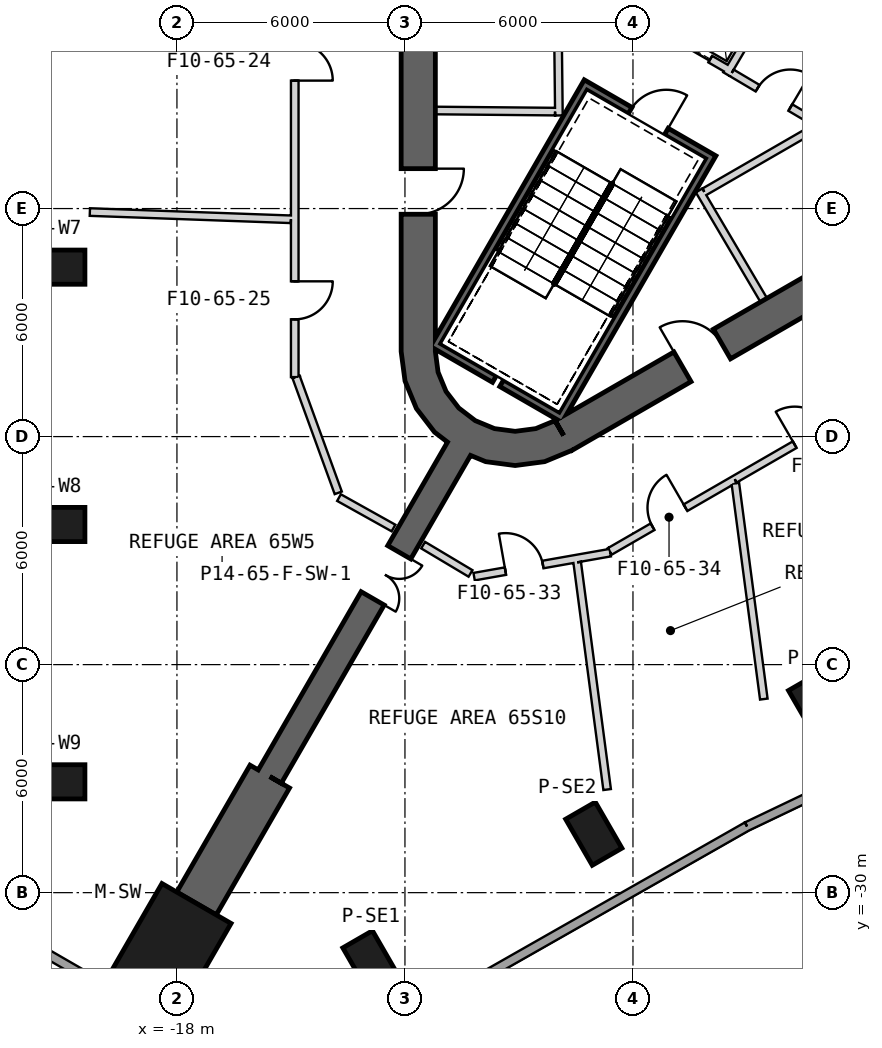
"""IFC4 building model, lengths in metres.
Left out: names, types, materials, properties, quantities, classifications, styles, units other than length and angle.
Written with IfcOpenShell. Run it as: python <this file> out.ifc"""

import sys

from ifc_helpers import new_model, si_unit, direction, frame, frame_2d, origin, origin_2d, place, context, subcontext, project, spatial, polyline, rectangle, outline, extrude, element, fill, save


model = new_model("IFC4")
c1 = context("Model", 3, precision=1e-05, world=origin(), true_north=direction((0.0, 1.0)))
c2 = subcontext(c1, "Body", "Model", "MODEL_VIEW")
j1 = project(units=[si_unit("LENGTHUNIT", "METRE"), si_unit("PLANEANGLEUNIT", "RADIAN")], contexts=[c1])
p1 = place(None, origin())
s1 = spatial("IfcSite", under=j1, at=p1, CompositionType="ELEMENT")
p2 = place(p1, origin())
s2 = spatial("IfcBuilding", under=s1, at=p2, CompositionType="ELEMENT")
p3 = place(p2, frame((0.0, 0.0, 292.7)))
s3 = spatial("IfcBuildingStorey", under=s2, at=p3, CompositionType="ELEMENT", Elevation=292.7)
p4 = place(p3, frame((-18.135, -31.411, 0.0), z_axis=(0.0, 0.0, 1.0), x_axis=(-0.5, -0.866025403784, 0.0)))
e1 = element("IfcColumn", 1, at=p4, inside=s3, PredefinedType="COLUMN", context=c2, shape_type="SweptSolid", body=[
    extrude(rectangle(XDim=2.6, YDim=2.1, at=origin_2d()), origin(), (0.0, 0.0, 1.0), 5.7),
])
for number, where, z_axis, x_axis in (
    (2, (-21.121, -13.542, 0.0), (0.0, 0.0, 1.0), (-1.0, 0.0, 0.0)),
    (3, (-21.121, -20.313, 0.0), (0.0, 0.0, 1.0), (-1.0, 0.0, 0.0)),
    (4, (-21.121, -27.084, 0.0), (0.0, 0.0, 1.0), (-1.0, 0.0, 0.0)),
    (5, (-12.895, -31.833, 0.0), (0.0, 0.0, 1.0), (0.5, -0.866, 0.0)),
    (6, (-7.031, -28.448, 0.0), (0.0, 0.0, 1.0), (0.5, -0.866, 0.0)),
    (7, (-1.167, -25.063, 0.0), (0.0, 0.0, 1.0), (0.5, -0.866, 0.0)),
):
    element("IfcColumn", number, at=place(p3, frame(where, z_axis=z_axis, x_axis=x_axis)), inside=s3, PredefinedType="COLUMN", context=c2, shape_type="SweptSolid", body=[
        extrude(rectangle(XDim=1.4, YDim=0.9, at=origin_2d()), origin(), (0.0, 0.0, 1.0), 5.7),
    ])
p5 = place(p3, frame((-11.65, 15.762, 0.0), z_axis=(0.0, 0.0, 1.0), x_axis=(0.0, -1.0, 0.0)))
e8 = element("IfcWall", 8, at=p5, inside=s3, PredefinedType="SHEAR", context=c2, shape_type="SweptSolid", body=[
    extrude(rectangle(XDim=31.523, YDim=0.9, at=frame_2d((15.762, 0.0))), origin(), (0.0, 0.0, 1.0), 6.0),
])
p6 = place(p5, frame((3.612, 0.0, 0.0)))
e9 = element("IfcOpeningElement", 9, at=p6, cuts=e8, PredefinedType="OPENING", context=c2, shape_type="SweptSolid", body=[
    extrude(rectangle(XDim=1.2, YDim=2.4, at=frame_2d((0.6, 1.2))), frame((0.0, 0.46, 0.0), z_axis=(0.0, -1.0, 0.0), x_axis=(1.0, 0.0, 0.0)), (0.0, 0.0, 1.0), 0.92),
])
p7 = place(p5, frame((26.712, 0.0, 0.0)))
e10 = element("IfcOpeningElement", 10, at=p7, cuts=e8, PredefinedType="OPENING", context=c2, shape_type="SweptSolid", body=[
    extrude(rectangle(XDim=1.2, YDim=2.4, at=frame_2d((0.6, 1.2))), frame((0.0, 0.46, 0.0), z_axis=(0.0, -1.0, 0.0), x_axis=(1.0, 0.0, 0.0)), (0.0, 0.0, 1.0), 0.92),
])
p8 = place(p3, frame((-7.825, -17.97, 0.0), z_axis=(0.0, 0.0, 1.0), x_axis=(0.866028369851, 0.499994862586, 0.0)))
e11 = element("IfcWall", 11, at=p8, inside=s3, PredefinedType="SHEAR", context=c2, shape_type="SweptSolid", body=[
    extrude(rectangle(XDim=31.523, YDim=0.9, at=frame_2d((15.762, 0.0))), origin(), (0.0, 0.0, 1.0), 6.0),
])
p9 = place(p8, frame((26.712, 0.0, 0.0)))
e12 = element("IfcOpeningElement", 12, at=p9, cuts=e11, PredefinedType="OPENING", context=c2, shape_type="SweptSolid", body=[
    extrude(rectangle(XDim=1.2, YDim=2.4, at=frame_2d((0.6, 1.2))), frame((0.0, 0.46, 0.0), z_axis=(0.0, -1.0, 0.0), x_axis=(1.0, 0.0, 0.0)), (0.0, 0.0, 1.0), 0.92),
])
p10 = place(p8, frame((3.612, 0.0, 0.0)))
e13 = element("IfcOpeningElement", 13, at=p10, cuts=e11, PredefinedType="OPENING", context=c2, shape_type="SweptSolid", body=[
    extrude(rectangle(XDim=1.2, YDim=2.4, at=frame_2d((0.6, 1.2))), frame((0.0, 0.46, 0.0), z_axis=(0.0, -1.0, 0.0), x_axis=(1.0, 0.0, 0.0)), (0.0, 0.0, 1.0), 0.92),
])
p11 = place(p3, origin())
e14 = element("IfcWall", 14, at=p11, inside=s3, PredefinedType="SHEAR", context=c2, shape_type="SweptSolid", body=[
    extrude(outline(polyline([(-12.1, -15.762), (-11.998, -16.538), (-11.698, -17.262), (-11.221, -17.883), (-10.6, -18.36), (-9.876, -18.659), (-9.1, -18.762), (-8.323, -18.659), (-7.6, -18.36), (-8.05, -17.58), (-8.556, -17.79), (-9.1, -17.862), (-9.644, -17.79), (-10.15, -17.58), (-10.585, -17.247), (-10.919, -16.812), (-11.128, -16.305), (-11.2, -15.762), (-12.1, -15.762)])), origin(), (0.0, 0.0, 1.0), 6.0),
])
p12 = place(p3, frame((-10.575, -18.316, 0.0), z_axis=(0.0, 0.0, 1.0), x_axis=(-0.500007350791, -0.866021159762, 0.0)))
e15 = element("IfcWall", 15, at=p12, inside=s3, PredefinedType="SHEAR", context=c2, shape_type="SweptSolid", body=[
    extrude(rectangle(XDim=9.965, YDim=0.7, at=frame_2d((4.982, 0.0))), origin(), (0.0, 0.0, 1.0), 6.0),
])
p13 = place(p12, frame((3.15, 0.0, 0.0)))
e16 = element("IfcOpeningElement", 16, at=p13, cuts=e15, PredefinedType="OPENING", context=c2, shape_type="SweptSolid", body=[
    extrude(rectangle(XDim=1.4, YDim=2.4, at=frame_2d((0.7, 1.2))), frame((0.0, 0.36, 0.0), z_axis=(0.0, -1.0, 0.0), x_axis=(1.0, 0.0, 0.0)), (0.0, 0.0, 1.0), 0.72),
])
p14 = place(p3, frame((-15.557, -26.946, -0.35), z_axis=(0.0, 0.0, 1.0), x_axis=(-0.499980071345, -0.866036909293, 0.0)))
e17 = element("IfcWall", 17, at=p14, inside=s3, PredefinedType="SHEAR", context=c2, shape_type="SweptSolid", body=[
    extrude(rectangle(XDim=3.856, YDim=1.2, at=frame_2d((1.928, 0.0))), origin(), (0.0, 0.0, 1.0), 6.35),
])
p15 = place(p3, frame((-21.986, -31.283, 0.0), z_axis=(0.0, 0.0, 1.0), x_axis=(0.866022320763, -0.500005339912, 0.0)))
e18 = element("IfcWall", 18, at=p15, inside=s3, PredefinedType="SOLIDWALL", context=c2, shape_type="SweptSolid", body=[
    extrude(rectangle(XDim=6.798, YDim=0.24, at=frame_2d((3.399, 0.0))), origin(), (0.0, 0.0, 1.0), 5.7),
])
p16 = place(p3, frame((-12.683, -33.767, 0.0), z_axis=(0.0, 0.0, 1.0), x_axis=(0.869200201648, 0.494460321416, 0.0)))
e19 = element("IfcWall", 19, at=p16, inside=s3, PredefinedType="SOLIDWALL", context=c2, shape_type="SweptSolid", body=[
    extrude(rectangle(XDim=11.143, YDim=0.24, at=frame_2d((5.571, 0.0))), origin(), (0.0, 0.0, 1.0), 5.7),
])
p17 = place(p3, frame((-2.998, -28.258, 0.0), z_axis=(0.0, 0.0, 1.0), x_axis=(0.902255372, 0.43120209148, 0.0)))
e20 = element("IfcWall", 20, at=p17, inside=s3, PredefinedType="SOLIDWALL", context=c2, shape_type="SweptSolid", body=[
    extrude(rectangle(XDim=33.548, YDim=0.24, at=frame_2d((16.774, 0.0))), origin(), (0.0, 0.0, 1.0), 5.7),
])
p18 = place(p3, frame((-7.979, -6.85, 0.0), z_axis=(0.0, 0.0, 1.0), x_axis=(0.011121475088, -0.999938154483, 0.0)))
e21 = element("IfcWall", 21, at=p18, inside=s3, PredefinedType="PLUMBINGWALL", context=c2, shape_type="SweptSolid", body=[
    extrude(rectangle(XDim=2.7, YDim=0.2, at=frame_2d((1.35, 0.0))), origin(), (0.0, 0.0, 1.0), 5.7),
])
p19 = place(p3, frame((-8.05, -9.449, 0.0), z_axis=(0.0, 0.0, 1.0), x_axis=(-0.999957467379, 0.009222983926, 0.0)))
e22 = element("IfcWall", 22, at=p19, inside=s3, PredefinedType="PLUMBINGWALL", context=c2, shape_type="SweptSolid", body=[
    extrude(rectangle(XDim=3.15, YDim=0.2, at=frame_2d((1.575, 0.0))), origin(), (0.0, 0.0, 1.0), 5.7),
])
p20 = place(p3, frame((-3.905, -10.563, -0.35), z_axis=(0.0, 0.0, 1.0), x_axis=(-0.500012932018, -0.866017937352, 0.0)))
e23 = element("IfcWall", 23, at=p20, inside=s3, PredefinedType="SHEAR", context=c2, shape_type="SweptSolid", body=[
    extrude(rectangle(XDim=8.1, YDim=0.2, at=frame_2d((4.05, 0.0))), origin(), (0.0, 0.0, 1.0), 6.05),
])
p21 = place(p3, frame((-11.282, -15.541, -0.35), z_axis=(0.0, 0.0, 1.0), x_axis=(0.866000578957, -0.500042995397, 0.0)))
e24 = element("IfcWall", 24, at=p21, inside=s3, PredefinedType="SHEAR", context=c2, shape_type="SweptSolid", body=[
    extrude(rectangle(XDim=1.89, YDim=0.2, at=frame_2d((0.945, 0.0))), origin(), (0.0, 0.0, 1.0), 6.05),
])
p22 = place(p3, frame((-9.455, -16.596, -0.35), z_axis=(0.0, 0.0, 1.0), x_axis=(0.866038843867, -0.499976720371, 0.0)))
e25 = element("IfcWall", 25, at=p22, inside=s3, PredefinedType="SHEAR", context=c2, shape_type="SweptSolid", body=[
    extrude(rectangle(XDim=1.69, YDim=0.2, at=frame_2d((0.845, 0.0))), origin(), (0.0, 0.0, 1.0), 6.05),
])
p23 = place(p3, frame((-7.196, -8.663, -0.35), z_axis=(0.0, 0.0, 1.0), x_axis=(-0.499997992926, -0.866026562566, 0.0)))
e26 = element("IfcWall", 26, at=p23, inside=s3, PredefinedType="SHEAR", context=c2, shape_type="SweptSolid", body=[
    extrude(rectangle(XDim=7.9, YDim=0.2, at=frame_2d((3.95, 0.0))), origin(), (0.0, 0.0, 1.0), 6.05),
])
p24 = place(p3, frame((-4.041, -10.599, -0.35), z_axis=(0.0, 0.0, 1.0), x_axis=(-0.866047807691, 0.499961193289, 0.0)))
e27 = element("IfcWall", 27, at=p24, inside=s3, PredefinedType="SHEAR", context=c2, shape_type="SweptSolid", body=[
    extrude(rectangle(XDim=3.6, YDim=0.2, at=frame_2d((1.8, 0.0))), origin(), (0.0, 0.0, 1.0), 6.05),
])
p25 = place(p24, frame((1.25, 0.0, 0.35)))
e28 = element("IfcOpeningElement", 28, at=p25, cuts=e27, PredefinedType="OPENING", context=c2, shape_type="SweptSolid", body=[
    extrude(rectangle(XDim=1.1, YDim=2.1, at=frame_2d((0.55, 1.05))), frame((0.0, 0.11, 0.0), z_axis=(0.0, -1.0, 0.0), x_axis=(1.0, 0.0, 0.0)), (0.0, 0.0, 1.0), 0.22),
])
p26 = place(p3, frame((-3.446, -8.368, 0.0), z_axis=(0.0, 0.0, 1.0), x_axis=(-0.866024647952, 0.500001309137, 0.0)))
e29 = element("IfcWall", 29, at=p26, inside=s3, PredefinedType="PLUMBINGWALL", context=c2, shape_type="SweptSolid", body=[
    extrude(rectangle(XDim=2.4, YDim=0.2, at=frame_2d((1.2, 0.0))), origin(), (0.0, 0.0, 1.0), 5.7),
])
p27 = place(p26, frame((0.6, 0.0, 0.0)))
e30 = element("IfcOpeningElement", 30, at=p27, cuts=e29, PredefinedType="OPENING", context=c2, shape_type="SweptSolid", body=[
    extrude(rectangle(XDim=1.2, YDim=2.4, at=frame_2d((0.6, 1.2))), frame((0.0, 0.11, 0.0), z_axis=(0.0, -1.0, 0.0), x_axis=(1.0, 0.0, 0.0)), (0.0, 0.0, 1.0), 0.22),
])
p28 = place(p3, frame((-2.012, -5.882, 0.0), z_axis=(0.0, 0.0, 1.0), x_axis=(-0.508619639323, -0.860991325447, 0.0)))
e31 = element("IfcWall", 31, at=p28, inside=s3, PredefinedType="PLUMBINGWALL", context=c2, shape_type="SweptSolid", body=[
    extrude(rectangle(XDim=3.0, YDim=0.2, at=frame_2d((1.5, 0.0))), origin(), (0.0, 0.0, 1.0), 5.7),
])
p29 = place(p3, frame((-4.26, -11.524, 0.0), z_axis=(0.0, 0.0, 1.0), x_axis=(0.507997497166, -0.861358544901, 0.0)))
e32 = element("IfcWall", 32, at=p29, inside=s3, PredefinedType="PARTITIONING", context=c2, shape_type="SweptSolid", body=[
    extrude(rectangle(XDim=3.35, YDim=0.2, at=frame_2d((1.675, 0.0))), origin(), (0.0, 0.0, 1.0), 5.7),
])
p30 = place(p3, frame((-1.024, -9.771, 0.0), z_axis=(0.0, 0.0, 1.0), x_axis=(-0.866029903013, -0.499992207027, 0.0)))
e33 = element("IfcWall", 33, at=p30, inside=s3, PredefinedType="PARTITIONING", context=c2, shape_type="SweptSolid", body=[
    extrude(rectangle(XDim=3.578, YDim=0.2, at=frame_2d((1.789, 0.0))), origin(), (0.0, 0.0, 1.0), 5.7),
])
p31 = place(p3, frame((-3.401, -8.43, 0.0), z_axis=(0.0, 0.0, 1.0), x_axis=(0.860630814782, -0.509229418482, 0.0)))
e34 = element("IfcWall", 34, at=p31, inside=s3, PredefinedType="PARTITIONING", context=c2, shape_type="SweptSolid", body=[
    extrude(rectangle(XDim=2.582, YDim=0.2, at=frame_2d((1.291, 0.0))), origin(), (0.0, 0.0, 1.0), 5.7),
])
p32 = place(p31, frame((0.791, 0.0, 0.0)))
e35 = element("IfcOpeningElement", 35, at=p32, cuts=e34, PredefinedType="OPENING", context=c2, shape_type="SweptSolid", body=[
    extrude(rectangle(XDim=1.0, YDim=2.1, at=frame_2d((0.5, 1.05))), frame((0.0, 0.11, 0.0), z_axis=(0.0, -1.0, 0.0), x_axis=(1.0, 0.0, 0.0)), (0.0, 0.0, 1.0), 0.22),
])
p33 = place(p3, frame((-14.9, 16.435, 0.0), z_axis=(0.0, 0.0, 1.0), x_axis=(0.0, -1.0, 0.0)))
e36 = element("IfcWall", 36, at=p33, inside=s3, PredefinedType="PARTITIONING", context=c2, shape_type="SweptSolid", body=[
    extrude(rectangle(XDim=32.87, YDim=0.2, at=frame_2d((16.435, 0.0))), origin(), (0.0, 0.0, 1.0), 4.98),
])
p34 = place(p33, frame((1.5, 0.0, 0.0)))
e37 = element("IfcOpeningElement", 37, at=p34, cuts=e36, PredefinedType="OPENING", context=c2, shape_type="SweptSolid", body=[
    extrude(rectangle(XDim=1.0, YDim=2.1, at=frame_2d((0.5, 1.05))), frame((0.0, 0.11, 0.0), z_axis=(0.0, -1.0, 0.0), x_axis=(1.0, 0.0, 0.0)), (0.0, 0.0, 1.0), 0.22),
])
p35 = place(p33, frame((7.506, 0.0, 0.0)))
e38 = element("IfcOpeningElement", 38, at=p35, cuts=e36, PredefinedType="OPENING", context=c2, shape_type="SweptSolid", body=[
    extrude(rectangle(XDim=1.0, YDim=2.1, at=frame_2d((0.5, 1.05))), frame((0.0, 0.11, 0.0), z_axis=(0.0, -1.0, 0.0), x_axis=(1.0, 0.0, 0.0)), (0.0, 0.0, 1.0), 0.22),
])
p36 = place(p33, frame((15.787, 0.0, 0.0)))
e39 = element("IfcOpeningElement", 39, at=p36, cuts=e36, PredefinedType="OPENING", context=c2, shape_type="SweptSolid", body=[
    extrude(rectangle(XDim=1.0, YDim=2.1, at=frame_2d((0.5, 1.05))), frame((0.0, 0.11, 0.0), z_axis=(0.0, -1.0, 0.0), x_axis=(1.0, 0.0, 0.0)), (0.0, 0.0, 1.0), 0.22),
])
p37 = place(p33, frame((24.068, 0.0, 0.0)))
e40 = element("IfcOpeningElement", 40, at=p37, cuts=e36, PredefinedType="OPENING", context=c2, shape_type="SweptSolid", body=[
    extrude(rectangle(XDim=1.0, YDim=2.1, at=frame_2d((0.5, 1.05))), frame((0.0, 0.11, 0.0), z_axis=(0.0, -1.0, 0.0), x_axis=(1.0, 0.0, 0.0)), (0.0, 0.0, 1.0), 0.22),
])
p38 = place(p33, frame((30.35, 0.0, 0.0)))
e41 = element("IfcOpeningElement", 41, at=p38, cuts=e36, PredefinedType="OPENING", context=c2, shape_type="SweptSolid", body=[
    extrude(rectangle(XDim=1.0, YDim=2.1, at=frame_2d((0.5, 1.05))), frame((0.0, 0.11, 0.0), z_axis=(0.0, -1.0, 0.0), x_axis=(1.0, 0.0, 0.0)), (0.0, 0.0, 1.0), 0.22),
])
p39 = place(p3, frame((-13.735, -19.606, 0.0), z_axis=(0.0, 0.0, 1.0), x_axis=(0.873202114915, -0.487358252733, 0.0)))
e42 = element("IfcWall", 42, at=p39, inside=s3, PredefinedType="PARTITIONING", context=c2, shape_type="SweptSolid", body=[
    extrude(rectangle(XDim=1.643, YDim=0.2, at=frame_2d((0.821, 0.0))), origin(), (0.0, 0.0, 1.0), 5.7),
])
p40 = place(p3, frame((-14.866, -16.429, 0.0), z_axis=(0.0, 0.0, 1.0), x_axis=(0.342002619796, -0.939698998644, 0.0)))
e43 = element("IfcWall", 43, at=p40, inside=s3, PredefinedType="PARTITIONING", context=c2, shape_type="SweptSolid", body=[
    extrude(rectangle(XDim=3.247, YDim=0.2, at=frame_2d((1.624, 0.0))), origin(), (0.0, 0.0, 1.0), 5.7),
])
p41 = place(p3, frame((-15.0, -12.282, 0.0), z_axis=(0.0, 0.0, 1.0), x_axis=(-0.999353066749, 0.03596453779, 0.0)))
e44 = element("IfcWall", 44, at=p41, inside=s3, PredefinedType="PARTITIONING", context=c2, shape_type="SweptSolid", body=[
    extrude(rectangle(XDim=5.295, YDim=0.2, at=frame_2d((2.647, 0.0))), origin(), (0.0, 0.0, 1.0), 5.07),
])
p42 = place(p3, frame((-10.18, -21.685, 0.0), z_axis=(0.0, 0.0, 1.0), x_axis=(0.984808550308, 0.173643655919, 0.0)))
e45 = element("IfcWall", 45, at=p42, inside=s3, PredefinedType="PARTITIONING", context=c2, shape_type="SweptSolid", body=[
    extrude(rectangle(XDim=3.637, YDim=0.2, at=frame_2d((1.819, 0.0))), origin(), (0.0, 0.0, 1.0), 4.88),
])
p43 = place(p42, frame((0.837, 0.0, 0.0)))
e46 = element("IfcOpeningElement", 46, at=p43, cuts=e45, PredefinedType="OPENING", context=c2, shape_type="SweptSolid", body=[
    extrude(rectangle(XDim=1.0, YDim=2.1, at=frame_2d((0.5, 1.05))), frame((0.0, 0.11, 0.0), z_axis=(0.0, -1.0, 0.0), x_axis=(1.0, 0.0, 0.0)), (0.0, 0.0, 1.0), 0.22),
])
p44 = place(p3, frame((-11.522, -20.856, 0.0), z_axis=(0.0, 0.0, 1.0), x_axis=(0.858662468137, -0.512541477163, 0.0)))
e47 = element("IfcWall", 47, at=p44, inside=s3, PredefinedType="PARTITIONING", context=c2, shape_type="SweptSolid", body=[
    extrude(rectangle(XDim=1.452, YDim=0.2, at=frame_2d((0.726, 0.0))), origin(), (0.0, 0.0, 1.0), 5.7),
])
p45 = place(p3, frame((-6.61, -21.021, 0.0), z_axis=(0.0, 0.0, 1.0), x_axis=(0.866014229038, 0.500019354728, 0.0)))
e48 = element("IfcWall", 48, at=p45, inside=s3, PredefinedType="PARTITIONING", context=c2, shape_type="SweptSolid", body=[
    extrude(rectangle(XDim=3.796, YDim=0.2, at=frame_2d((1.898, 0.0))), origin(), (0.0, 0.0, 1.0), 4.98),
])
p46 = place(p45, frame((1.3, 0.0, 0.0)))
e49 = element("IfcOpeningElement", 49, at=p46, cuts=e48, PredefinedType="OPENING", context=c2, shape_type="SweptSolid", body=[
    extrude(rectangle(XDim=1.0, YDim=2.1, at=frame_2d((0.5, 1.05))), frame((0.0, 0.11, 0.0), z_axis=(0.0, -1.0, 0.0), x_axis=(1.0, 0.0, 0.0)), (0.0, 0.0, 1.0), 0.22),
])
p47 = place(p3, frame((-3.322, -19.123, 0.0), z_axis=(0.0, 0.0, 1.0), x_axis=(0.866020577108, 0.500008359956, 0.0)))
e50 = element("IfcWall", 50, at=p47, inside=s3, PredefinedType="PARTITIONING", context=c2, shape_type="SweptSolid", body=[
    extrude(rectangle(XDim=4.805, YDim=0.2, at=frame_2d((2.402, 0.0))), origin(), (0.0, 0.0, 1.0), 5.07),
])
p48 = place(p47, frame((1.822, 0.0, 0.0)))
e51 = element("IfcOpeningElement", 51, at=p48, cuts=e50, PredefinedType="OPENING", context=c2, shape_type="SweptSolid", body=[
    extrude(rectangle(XDim=1.0, YDim=2.1, at=frame_2d((0.5, 1.05))), frame((0.0, 0.11, 0.0), z_axis=(0.0, -1.0, 0.0), x_axis=(1.0, 0.0, 0.0)), (0.0, 0.0, 1.0), 0.22),
])
p49 = place(p3, frame((-6.68, -27.287, 0.0), z_axis=(0.0, 0.0, 1.0), x_axis=(-0.1307739392, 0.991412213373, 0.0)))
e52 = element("IfcWall", 52, at=p49, inside=s3, PredefinedType="PARTITIONING", context=c2, shape_type="SweptSolid", body=[
    extrude(rectangle(XDim=6.03, YDim=0.2, at=frame_2d((3.015, 0.0))), origin(), (0.0, 0.0, 1.0), 4.98),
])
p50 = place(p3, frame((-3.306, -19.229, 0.0), z_axis=(0.0, 0.0, 1.0), x_axis=(0.130789743481, -0.991410128554, 0.0)))
e53 = element("IfcWall", 53, at=p50, inside=s3, PredefinedType="PARTITIONING", context=c2, shape_type="SweptSolid", body=[
    extrude(rectangle(XDim=5.727, YDim=0.2, at=frame_2d((2.863, 0.0))), origin(), (0.0, 0.0, 1.0), 5.7),
])
p51 = place(p25, origin())
e54 = element("IfcDoor", 54, at=p51, inside=s3, OperationType="SINGLE_SWING_LEFT", PredefinedType="USERDEFINED", context=c2, shape_type="SweptSolid", body=[
    extrude(rectangle(XDim=1.1, YDim=2.1, at=frame_2d((0.55, 1.05))), frame((0.0, 0.025, 0.0), z_axis=(0.0, -1.0, 0.0), x_axis=(1.0, 0.0, 0.0)), (0.0, 0.0, 1.0), 0.05),
])
fill(e28, e54)
p52 = place(p32, origin())
e55 = element("IfcDoor", 55, at=p52, inside=s3, OperationType="SINGLE_SWING_RIGHT", PredefinedType="USERDEFINED", context=c2, shape_type="SweptSolid", body=[
    extrude(rectangle(XDim=1.0, YDim=2.1, at=frame_2d((0.5, 1.05))), frame((0.0, 0.025, 0.0), z_axis=(0.0, -1.0, 0.0), x_axis=(1.0, 0.0, 0.0)), (0.0, 0.0, 1.0), 0.05),
])
fill(e35, e55)
p53 = place(p27, origin())
e56 = element("IfcDoor", 56, at=p53, inside=s3, OperationType="SLIDING_TO_LEFT", PredefinedType="USERDEFINED", context=c2, shape_type="SweptSolid", body=[
    extrude(rectangle(XDim=1.2, YDim=2.4, at=frame_2d((0.6, 1.2))), frame((0.0, 0.025, 0.0), z_axis=(0.0, -1.0, 0.0), x_axis=(1.0, 0.0, 0.0)), (0.0, 0.0, 1.0), 0.05),
])
fill(e30, e56)
p54 = place(p37, origin())
e57 = element("IfcDoor", 57, at=p54, inside=s3, OperationType="SINGLE_SWING_RIGHT", PredefinedType="USERDEFINED", context=c2, shape_type="SweptSolid", body=[
    extrude(rectangle(XDim=1.0, YDim=2.1, at=frame_2d((0.5, 1.05))), frame((0.0, 0.025, 0.0), z_axis=(0.0, -1.0, 0.0), x_axis=(1.0, 0.0, 0.0)), (0.0, 0.0, 1.0), 0.05),
])
fill(e40, e57)
p55 = place(p38, origin())
e58 = element("IfcDoor", 58, at=p55, inside=s3, OperationType="SINGLE_SWING_LEFT", PredefinedType="USERDEFINED", context=c2, shape_type="SweptSolid", body=[
    extrude(rectangle(XDim=1.0, YDim=2.1, at=frame_2d((0.5, 1.05))), frame((0.0, 0.025, 0.0), z_axis=(0.0, -1.0, 0.0), x_axis=(1.0, 0.0, 0.0)), (0.0, 0.0, 1.0), 0.05),
])
fill(e41, e58)
p56 = place(p43, origin())
e59 = element("IfcDoor", 59, at=p56, inside=s3, OperationType="SINGLE_SWING_LEFT", PredefinedType="USERDEFINED", context=c2, shape_type="SweptSolid", body=[
    extrude(rectangle(XDim=1.0, YDim=2.1, at=frame_2d((0.5, 1.05))), frame((0.0, 0.025, 0.0), z_axis=(0.0, -1.0, 0.0), x_axis=(1.0, 0.0, 0.0)), (0.0, 0.0, 1.0), 0.05),
])
fill(e46, e59)
p57 = place(p46, origin())
e60 = element("IfcDoor", 60, at=p57, inside=s3, OperationType="SINGLE_SWING_RIGHT", PredefinedType="USERDEFINED", context=c2, shape_type="SweptSolid", body=[
    extrude(rectangle(XDim=1.0, YDim=2.1, at=frame_2d((0.5, 1.05))), frame((0.0, 0.025, 0.0), z_axis=(0.0, -1.0, 0.0), x_axis=(1.0, 0.0, 0.0)), (0.0, 0.0, 1.0), 0.05),
])
fill(e49, e60)
p58 = place(p48, origin())
e61 = element("IfcDoor", 61, at=p58, inside=s3, OperationType="SINGLE_SWING_LEFT", PredefinedType="USERDEFINED", context=c2, shape_type="SweptSolid", body=[
    extrude(rectangle(XDim=1.0, YDim=2.1, at=frame_2d((0.5, 1.05))), frame((0.0, 0.025, 0.0), z_axis=(0.0, -1.0, 0.0), x_axis=(1.0, 0.0, 0.0)), (0.0, 0.0, 1.0), 0.05),
])
fill(e51, e61)
p59 = place(p7, origin())
e62 = element("IfcDoor", 62, at=p59, inside=s3, OperationType="SINGLE_SWING_LEFT", PredefinedType="USERDEFINED", context=c2, shape_type="SweptSolid", body=[
    extrude(rectangle(XDim=1.2, YDim=2.4, at=frame_2d((0.6, 1.2))), frame((0.0, 0.025, 0.0), z_axis=(0.0, -1.0, 0.0), x_axis=(1.0, 0.0, 0.0)), (0.0, 0.0, 1.0), 0.05),
])
fill(e10, e62)
p60 = place(p10, origin())
e63 = element("IfcDoor", 63, at=p60, inside=s3, OperationType="SINGLE_SWING_LEFT", PredefinedType="USERDEFINED", context=c2, shape_type="SweptSolid", body=[
    extrude(rectangle(XDim=1.2, YDim=2.4, at=frame_2d((0.6, 1.2))), frame((0.0, 0.025, 0.0), z_axis=(0.0, -1.0, 0.0), x_axis=(1.0, 0.0, 0.0)), (0.0, 0.0, 1.0), 0.05),
])
fill(e13, e63)
p61 = place(p13, origin())
e64 = element("IfcDoor", 64, at=p61, inside=s3, OperationType="DOUBLE_DOOR_SINGLE_SWING", PredefinedType="NOTDEFINED", context=c2, shape_type="SweptSolid", body=[
    extrude(rectangle(XDim=1.4, YDim=2.4, at=frame_2d((0.7, 1.2))), frame((0.0, 0.025, 0.0), z_axis=(0.0, -1.0, 0.0), x_axis=(1.0, 0.0, 0.0)), (0.0, 0.0, 1.0), 0.05),
])
fill(e16, e64)
save(model, sys.argv[1])
